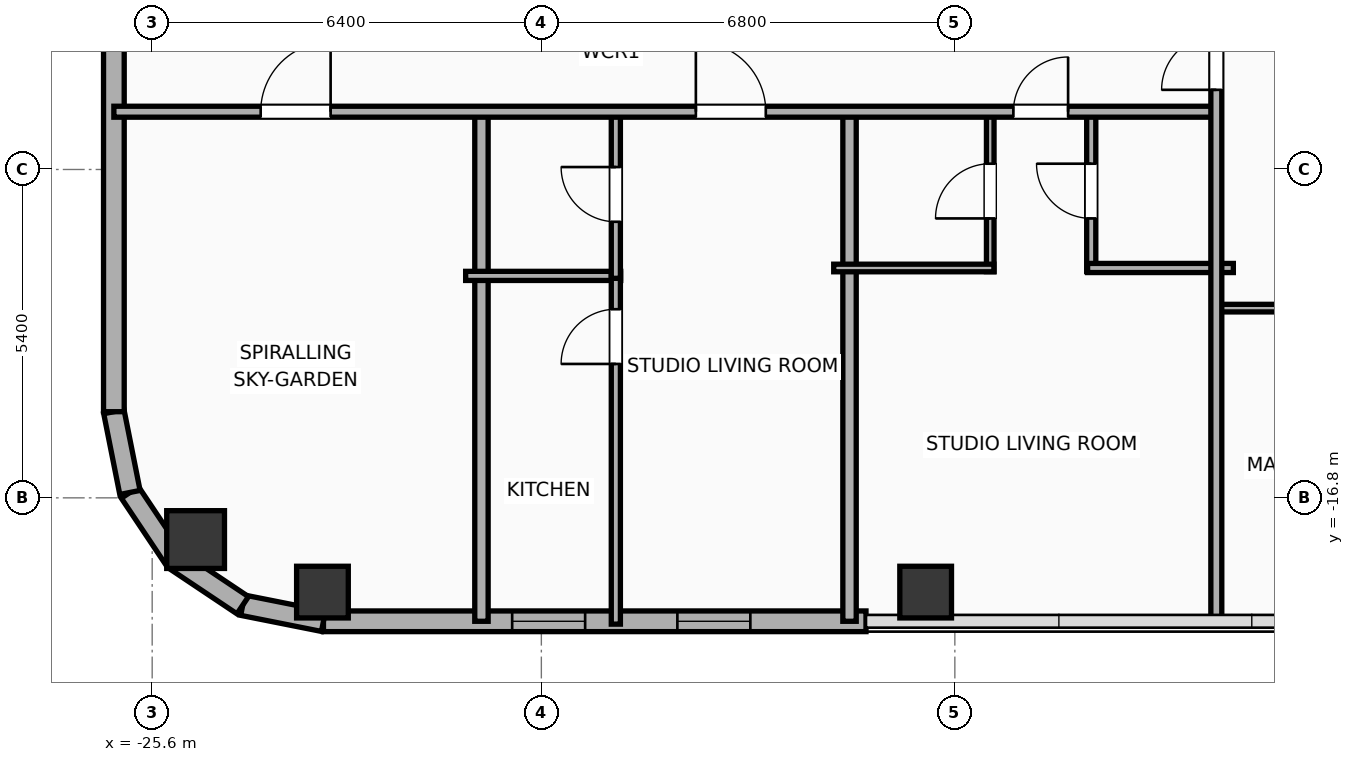
"""IFC4 building model, lengths in metres.
Left out: names, types, materials, properties, quantities, classifications, styles, units other than length and angle.
Written with IfcOpenShell. Run it as: python <this file> out.ifc"""

import sys

from ifc_helpers import new_model, si_unit, direction, frame, frame_2d, origin, origin_2d, place, context, subcontext, project, spatial, rectangle, hollow_rectangle, hollow_circle, extrude, element, fill, save


model = new_model("IFC4")
c1 = context("Model", 3, precision=1e-05, world=origin(), true_north=direction((0.0, 1.0)))
c2 = subcontext(c1, "Body", "Model", "MODEL_VIEW")
j1 = project(units=[si_unit("LENGTHUNIT", "METRE"), si_unit("PLANEANGLEUNIT", "RADIAN")], contexts=[c1])
p1 = place(None, origin())
s1 = spatial("IfcSite", under=j1, at=p1, CompositionType="ELEMENT")
p2 = place(p1, origin())
s2 = spatial("IfcBuilding", under=s1, at=p2, CompositionType="ELEMENT")
p3 = place(p2, frame((0.0, 0.0, 204.1)))
s3 = spatial("IfcBuildingStorey", under=s2, at=p3, CompositionType="ELEMENT", Elevation=204.1)
for number, where, z_axis, x_axis in (
    (1, (-22.8, -18.35, 0.0), (0.0, 0.0, 1.0), (1.0, 0.0, 0.0)),
    (2, (-12.88, -18.35, 0.0), (0.0, 0.0, 1.0), (1.0, 0.0, 0.0)),
):
    element("IfcColumn", number, at=place(p3, frame(where, z_axis=z_axis, x_axis=x_axis)), inside=s3, PredefinedType="COLUMN", context=c2, shape_type="SweptSolid", body=[
        extrude(hollow_rectangle(XDim=0.85, YDim=0.85, WallThickness=0.028, at=origin_2d()), origin(), (0.0, 0.0, 1.0), 3.9),
    ])
p4 = place(p3, frame((-24.886, -17.486, 0.0), z_axis=(0.0, 0.0, 1.0), x_axis=(1.0, 0.0, 0.0)))
e3 = element("IfcColumn", 3, at=p4, inside=s3, PredefinedType="COLUMN", context=c2, shape_type="SweptSolid", body=[
    extrude(hollow_circle(Radius=0.475, WallThickness=0.032, at=origin_2d()), origin(), (0.0, 0.0, 1.0), 3.9),
])
p5 = place(p3, frame((-13.861, -18.83, 0.0), z_axis=(0.0, 0.0, 1.0), x_axis=(-1.0, 0.0, 0.0)))
e4 = element("IfcWall", 4, at=p5, inside=s3, PredefinedType="ELEMENTEDWALL", context=c2, shape_type="SweptSolid", body=[
    extrude(rectangle(XDim=8.922, YDim=0.34, at=frame_2d((4.461, 0.0))), origin(), (0.0, 0.0, 1.0), 3.65),
])
p6 = place(p5, frame((1.902, 0.0, 0.75)))
e5 = element("IfcOpeningElement", 5, at=p6, cuts=e4, PredefinedType="OPENING", context=c2, shape_type="SweptSolid", body=[
    extrude(rectangle(XDim=1.2, YDim=2.05, at=frame_2d((0.6, 1.025))), frame((0.0, 0.18, 0.0), z_axis=(0.0, -1.0, 0.0), x_axis=(1.0, 0.0, 0.0)), (0.0, 0.0, 1.0), 0.36),
])
p7 = place(p5, frame((4.619, 0.0, 0.75)))
e6 = element("IfcOpeningElement", 6, at=p7, cuts=e4, PredefinedType="OPENING", context=c2, shape_type="SweptSolid", body=[
    extrude(rectangle(XDim=1.2, YDim=2.05, at=frame_2d((0.6, 1.025))), frame((0.0, 0.18, 0.0), z_axis=(0.0, -1.0, 0.0), x_axis=(1.0, 0.0, 0.0)), (0.0, 0.0, 1.0), 0.36),
])
p8 = place(p3, frame((-22.783, -18.83, 0.0), z_axis=(0.0, 0.0, 1.0), x_axis=(-0.980788153188, 0.195075878998, 0.0)))
e7 = element("IfcWall", 7, at=p8, inside=s3, PredefinedType="ELEMENTEDWALL", context=c2, shape_type="SweptSolid", body=[
    extrude(rectangle(XDim=1.354, YDim=0.34, at=frame_2d((0.677, 0.0))), origin(), (0.0, 0.0, 1.0), 3.65),
])
p9 = place(p3, frame((-24.111, -18.566, 0.0), z_axis=(0.0, 0.0, 1.0), x_axis=(-0.831403586725, 0.555669034571, 0.0)))
e8 = element("IfcWall", 8, at=p9, inside=s3, PredefinedType="ELEMENTEDWALL", context=c2, shape_type="SweptSolid", body=[
    extrude(rectangle(XDim=1.337, YDim=0.34, at=frame_2d((0.668, 0.0))), origin(), (0.0, 0.0, 1.0), 3.65),
])
p10 = place(p3, frame((-25.223, -17.823, 0.0), z_axis=(0.0, 0.0, 1.0), x_axis=(-0.555584683399, 0.831459956686, 0.0)))
e9 = element("IfcWall", 9, at=p10, inside=s3, PredefinedType="ELEMENTEDWALL", context=c2, shape_type="SweptSolid", body=[
    extrude(rectangle(XDim=1.337, YDim=0.34, at=frame_2d((0.668, 0.0))), origin(), (0.0, 0.0, 1.0), 3.65),
])
p11 = place(p3, frame((-25.966, -16.711, 0.0), z_axis=(0.0, 0.0, 1.0), x_axis=(-0.195110379894, 0.98078129043, 0.0)))
e10 = element("IfcWall", 10, at=p11, inside=s3, PredefinedType="ELEMENTEDWALL", context=c2, shape_type="SweptSolid", body=[
    extrude(rectangle(XDim=1.354, YDim=0.34, at=frame_2d((0.677, 0.0))), origin(), (0.0, 0.0, 1.0), 3.65),
])
p12 = place(p3, frame((-26.23, -15.383, 0.0), z_axis=(0.0, 0.0, 1.0), x_axis=(0.0, 1.0, 0.0)))
e11 = element("IfcWall", 11, at=p12, inside=s3, PredefinedType="ELEMENTEDWALL", context=c2, shape_type="SweptSolid", body=[
    extrude(rectangle(XDim=31.967, YDim=0.34, at=frame_2d((15.983, 0.0))), origin(), (0.0, 0.0, 1.0), 3.65),
])
p13 = place(p12, frame((29.431, 0.0, 0.75)))
e12 = element("IfcOpeningElement", 12, at=p13, cuts=e11, PredefinedType="OPENING", context=c2, shape_type="SweptSolid", body=[
    extrude(rectangle(XDim=1.2, YDim=2.05, at=frame_2d((0.6, 1.025))), frame((0.0, 0.18, 0.0), z_axis=(0.0, -1.0, 0.0), x_axis=(1.0, 0.0, 0.0)), (0.0, 0.0, 1.0), 0.36),
])
p14 = place(p12, frame((20.603, 0.0, 0.75)))
e13 = element("IfcOpeningElement", 13, at=p14, cuts=e11, PredefinedType="OPENING", context=c2, shape_type="SweptSolid", body=[
    extrude(rectangle(XDim=1.2, YDim=2.05, at=frame_2d((0.6, 1.025))), frame((0.0, 0.18, 0.0), z_axis=(0.0, -1.0, 0.0), x_axis=(1.0, 0.0, 0.0)), (0.0, 0.0, 1.0), 0.36),
])
p15 = place(p12, frame((9.778, 0.0, 0.75)))
e14 = element("IfcOpeningElement", 14, at=p15, cuts=e11, PredefinedType="OPENING", context=c2, shape_type="SweptSolid", body=[
    extrude(rectangle(XDim=1.2, YDim=2.05, at=frame_2d((0.6, 1.025))), frame((0.0, 0.18, 0.0), z_axis=(0.0, -1.0, 0.0), x_axis=(1.0, 0.0, 0.0)), (0.0, 0.0, 1.0), 0.36),
])
p16 = place(p3, frame((-20.185, -18.83, 0.0), z_axis=(0.0, 0.0, 1.0), x_axis=(0.0, 1.0, 0.0)))
e15 = element("IfcWall", 15, at=p16, inside=s3, PredefinedType="PARTITIONING", context=c2, shape_type="SweptSolid", body=[
    extrude(rectangle(XDim=8.46, YDim=0.22, at=frame_2d((4.23, 0.0))), origin(), (0.0, 0.0, 1.0), 3.09),
])
p17 = place(p3, frame((-20.445, -13.15, 0.0), z_axis=(0.0, 0.0, 1.0), x_axis=(1.0, 0.0, 0.0)))
e16 = element("IfcWall", 16, at=p17, inside=s3, PredefinedType="PLUMBINGWALL", context=c2, shape_type="SweptSolid", body=[
    extrude(rectangle(XDim=2.55, YDim=0.15, at=frame_2d((1.275, 0.0))), origin(), (0.0, 0.0, 1.0), 3.65),
])
p18 = place(p3, frame((-17.975, -18.877, 0.0), z_axis=(0.0, 0.0, 1.0), x_axis=(0.0, 1.0, 0.0)))
e17 = element("IfcWall", 17, at=p18, inside=s3, PredefinedType="PLUMBINGWALL", context=c2, shape_type="SweptSolid", body=[
    extrude(rectangle(XDim=5.767, YDim=0.15, at=frame_2d((2.883, 0.0))), origin(), (0.0, 0.0, 1.0), 3.65),
])
p19 = place(p18, frame((4.279, 0.0, 0.0)))
e18 = element("IfcOpeningElement", 18, at=p19, cuts=e17, PredefinedType="OPENING", context=c2, shape_type="SweptSolid", body=[
    extrude(rectangle(XDim=0.9, YDim=2.05, at=frame_2d((0.45, 1.025))), frame((0.0, 0.085, 0.0), z_axis=(0.0, -1.0, 0.0), x_axis=(1.0, 0.0, 0.0)), (0.0, 0.0, 1.0), 0.17),
])
p20 = place(p3, frame((-17.975, -13.19, 0.0), z_axis=(0.0, 0.0, 1.0), x_axis=(0.0, 1.0, 0.0)))
e19 = element("IfcWall", 19, at=p20, inside=s3, PredefinedType="PLUMBINGWALL", context=c2, shape_type="SweptSolid", body=[
    extrude(rectangle(XDim=2.76, YDim=0.15, at=frame_2d((1.38, 0.0))), origin(), (0.0, 0.0, 1.0), 3.65),
])
p21 = place(p20, frame((0.93, 0.0, 0.0)))
e20 = element("IfcOpeningElement", 20, at=p21, cuts=e19, PredefinedType="OPENING", context=c2, shape_type="SweptSolid", body=[
    extrude(rectangle(XDim=0.9, YDim=2.05, at=frame_2d((0.45, 1.025))), frame((0.0, 0.085, 0.0), z_axis=(0.0, -1.0, 0.0), x_axis=(1.0, 0.0, 0.0)), (0.0, 0.0, 1.0), 0.17),
])
p22 = place(p3, frame((-14.132, -18.83, 0.0), z_axis=(0.0, 0.0, 1.0), x_axis=(0.0, 1.0, 0.0)))
e21 = element("IfcWall", 21, at=p22, inside=s3, PredefinedType="PARTITIONING", context=c2, shape_type="SweptSolid", body=[
    extrude(rectangle(XDim=8.46, YDim=0.22, at=frame_2d((4.23, 0.0))), origin(), (0.0, 0.0, 1.0), 3.65),
])
p23 = place(p3, frame((-11.818, -13.08, 0.0), z_axis=(0.0, 0.0, 1.0), x_axis=(0.0, 1.0, 0.0)))
e22 = element("IfcWall", 22, at=p23, inside=s3, PredefinedType="PARTITIONING", context=c2, shape_type="SweptSolid", body=[
    extrude(rectangle(XDim=2.65, YDim=0.125, at=frame_2d((1.325, 0.0))), origin(), (0.0, 0.0, 1.0), 3.65),
])
p24 = place(p23, frame((0.875, 0.0, 0.0)))
e23 = element("IfcOpeningElement", 23, at=p24, cuts=e22, PredefinedType="OPENING", context=c2, shape_type="SweptSolid", body=[
    extrude(rectangle(XDim=0.9, YDim=2.05, at=frame_2d((0.45, 1.025))), frame((0.0, 0.073, 0.0), z_axis=(0.0, -1.0, 0.0), x_axis=(1.0, 0.0, 0.0)), (0.0, 0.0, 1.0), 0.145),
])
p25 = place(p3, frame((-10.157, -13.08, 0.0), z_axis=(0.0, 0.0, 1.0), x_axis=(0.0, 1.0, 0.0)))
e24 = element("IfcWall", 24, at=p25, inside=s3, PredefinedType="PLUMBINGWALL", context=c2, shape_type="SweptSolid", body=[
    extrude(rectangle(XDim=2.65, YDim=0.15, at=frame_2d((1.325, 0.0))), origin(), (0.0, 0.0, 1.0), 3.65),
])
p26 = place(p25, frame((0.875, 0.0, 0.0)))
e25 = element("IfcOpeningElement", 25, at=p26, cuts=e24, PredefinedType="OPENING", context=c2, shape_type="SweptSolid", body=[
    extrude(rectangle(XDim=0.9, YDim=2.05, at=frame_2d((0.45, 1.025))), frame((0.0, 0.085, 0.0), z_axis=(0.0, -1.0, 0.0), x_axis=(1.0, 0.0, 0.0)), (0.0, 0.0, 1.0), 0.17),
])
p27 = place(p3, frame((-14.392, -13.02, 0.0), z_axis=(0.0, 0.0, 1.0), x_axis=(1.0, 0.0, 0.0)))
e26 = element("IfcWall", 26, at=p27, inside=s3, PredefinedType="PARTITIONING", context=c2, shape_type="SweptSolid", body=[
    extrude(rectangle(XDim=2.634, YDim=0.125, at=frame_2d((1.317, 0.0))), origin(), (0.0, 0.0, 1.0), 3.65),
])
p28 = place(p3, frame((-10.217, -13.02, 0.0), z_axis=(0.0, 0.0, 1.0), x_axis=(1.0, 0.0, 0.0)))
e27 = element("IfcWall", 27, at=p28, inside=s3, PredefinedType="PLUMBINGWALL", context=c2, shape_type="SweptSolid", body=[
    extrude(rectangle(XDim=2.397, YDim=0.15, at=frame_2d((1.198, 0.0))), origin(), (0.0, 0.0, 1.0), 3.65),
])
p29 = place(p3, frame((-26.23, -10.45, 0.0), z_axis=(0.0, 0.0, 1.0), x_axis=(1.0, 0.0, 0.0)))
e28 = element("IfcWall", 28, at=p29, inside=s3, PredefinedType="PARTITIONING", context=c2, shape_type="SweptSolid", body=[
    extrude(rectangle(XDim=18.15, YDim=0.18, at=frame_2d((9.075, 0.0))), origin(), (0.0, 0.0, 1.0), 3.65),
])
p30 = place(p29, frame((2.414, 0.0, 0.0)))
e29 = element("IfcOpeningElement", 29, at=p30, cuts=e28, PredefinedType="OPENING", context=c2, shape_type="SweptSolid", body=[
    extrude(rectangle(XDim=1.15, YDim=2.05, at=frame_2d((0.575, 1.025))), frame((0.0, 0.1, 0.0), z_axis=(0.0, -1.0, 0.0), x_axis=(1.0, 0.0, 0.0)), (0.0, 0.0, 1.0), 0.2),
])
p31 = place(p29, frame((9.571, 0.0, 0.0)))
e30 = element("IfcOpeningElement", 30, at=p31, cuts=e28, PredefinedType="OPENING", context=c2, shape_type="SweptSolid", body=[
    extrude(rectangle(XDim=1.15, YDim=2.05, at=frame_2d((0.575, 1.025))), frame((0.0, 0.1, 0.0), z_axis=(0.0, -1.0, 0.0), x_axis=(1.0, 0.0, 0.0)), (0.0, 0.0, 1.0), 0.2),
])
p32 = place(p29, frame((14.792, 0.0, 0.0)))
e31 = element("IfcOpeningElement", 31, at=p32, cuts=e28, PredefinedType="OPENING", context=c2, shape_type="SweptSolid", body=[
    extrude(rectangle(XDim=0.9, YDim=2.05, at=frame_2d((0.45, 1.025))), frame((0.0, 0.1, 0.0), z_axis=(0.0, -1.0, 0.0), x_axis=(1.0, 0.0, 0.0)), (0.0, 0.0, 1.0), 0.2),
])
p33 = place(p3, frame((-8.08, -13.68, 0.0), z_axis=(0.0, 0.0, 1.0), x_axis=(1.0, 0.0, 0.0)))
e32 = element("IfcWall", 32, at=p33, inside=s3, PredefinedType="PARTITIONING", context=c2, shape_type="SweptSolid", body=[
    extrude(rectangle(XDim=8.06, YDim=0.125, at=frame_2d((4.03, 0.0))), origin(), (0.0, 0.0, 1.0), 3.65),
])
p34 = place(p33, frame((1.323, 0.0, 0.0)))
e33 = element("IfcOpeningElement", 33, at=p34, cuts=e32, PredefinedType="OPENING", context=c2, shape_type="SweptSolid", body=[
    extrude(rectangle(XDim=0.9, YDim=2.05, at=frame_2d((0.45, 1.025))), frame((0.0, 0.073, 0.0), z_axis=(0.0, -1.0, 0.0), x_axis=(1.0, 0.0, 0.0)), (0.0, 0.0, 1.0), 0.145),
])
p35 = place(p33, frame((4.547, 0.0, 0.0)))
e34 = element("IfcOpeningElement", 34, at=p35, cuts=e32, PredefinedType="OPENING", context=c2, shape_type="SweptSolid", body=[
    extrude(rectangle(XDim=0.9, YDim=2.05, at=frame_2d((0.45, 1.025))), frame((0.0, 0.073, 0.0), z_axis=(0.0, -1.0, 0.0), x_axis=(1.0, 0.0, 0.0)), (0.0, 0.0, 1.0), 0.145),
])
p36 = place(p3, frame((-8.1, -18.83, 0.0), z_axis=(0.0, 0.0, 1.0), x_axis=(0.0, 1.0, 0.0)))
e35 = element("IfcWall", 35, at=p36, inside=s3, PredefinedType="PARTITIONING", context=c2, shape_type="SweptSolid", body=[
    extrude(rectangle(XDim=9.99, YDim=0.18, at=frame_2d((4.995, 0.0))), origin(), (0.0, 0.0, 1.0), 3.65),
])
p37 = place(p36, frame((8.74, 0.0, 0.0)))
e36 = element("IfcOpeningElement", 36, at=p37, cuts=e35, PredefinedType="OPENING", context=c2, shape_type="SweptSolid", body=[
    extrude(rectangle(XDim=0.9, YDim=2.05, at=frame_2d((0.45, 1.025))), frame((0.0, 0.1, 0.0), z_axis=(0.0, -1.0, 0.0), x_axis=(1.0, 0.0, 0.0)), (0.0, 0.0, 1.0), 0.2),
])
p38 = place(p6, origin())
e37 = element("IfcWindow", 37, at=p38, inside=s3, PartitioningType="SINGLE_PANEL", PredefinedType="WINDOW", context=c2, shape_type="SweptSolid", body=[
    extrude(rectangle(XDim=1.2, YDim=2.05, at=frame_2d((0.6, 1.025))), frame((0.0, 0.03, 0.0), z_axis=(0.0, -1.0, 0.0), x_axis=(1.0, 0.0, 0.0)), (0.0, 0.0, 1.0), 0.06),
])
fill(e5, e37)
p39 = place(p7, origin())
e38 = element("IfcWindow", 38, at=p39, inside=s3, PartitioningType="SINGLE_PANEL", PredefinedType="WINDOW", context=c2, shape_type="SweptSolid", body=[
    extrude(rectangle(XDim=1.2, YDim=2.05, at=frame_2d((0.6, 1.025))), frame((0.0, 0.03, 0.0), z_axis=(0.0, -1.0, 0.0), x_axis=(1.0, 0.0, 0.0)), (0.0, 0.0, 1.0), 0.06),
])
fill(e6, e38)
p40 = place(p19, origin())
e39 = element("IfcDoor", 39, at=p40, inside=s3, OperationType="SINGLE_SWING_LEFT", PredefinedType="DOOR", context=c2, shape_type="SweptSolid", body=[
    extrude(rectangle(XDim=0.9, YDim=2.05, at=frame_2d((0.45, 1.025))), frame((0.0, 0.025, 0.0), z_axis=(0.0, -1.0, 0.0), x_axis=(1.0, 0.0, 0.0)), (0.0, 0.0, 1.0), 0.05),
])
fill(e18, e39)
p41 = place(p21, origin())
e40 = element("IfcDoor", 40, at=p41, inside=s3, OperationType="SINGLE_SWING_RIGHT", PredefinedType="DOOR", context=c2, shape_type="SweptSolid", body=[
    extrude(rectangle(XDim=0.9, YDim=2.05, at=frame_2d((0.45, 1.025))), frame((0.0, 0.025, 0.0), z_axis=(0.0, -1.0, 0.0), x_axis=(1.0, 0.0, 0.0)), (0.0, 0.0, 1.0), 0.05),
])
fill(e20, e40)
p42 = place(p24, origin())
e41 = element("IfcDoor", 41, at=p42, inside=s3, OperationType="SINGLE_SWING_LEFT", PredefinedType="DOOR", context=c2, shape_type="SweptSolid", body=[
    extrude(rectangle(XDim=0.9, YDim=2.05, at=frame_2d((0.45, 1.025))), frame((0.0, 0.025, 0.0), z_axis=(0.0, -1.0, 0.0), x_axis=(1.0, 0.0, 0.0)), (0.0, 0.0, 1.0), 0.05),
])
fill(e23, e41)
p43 = place(p26, origin())
e42 = element("IfcDoor", 42, at=p43, inside=s3, OperationType="SINGLE_SWING_RIGHT", PredefinedType="DOOR", context=c2, shape_type="SweptSolid", body=[
    extrude(rectangle(XDim=0.9, YDim=2.05, at=frame_2d((0.45, 1.025))), frame((0.0, 0.025, 0.0), z_axis=(0.0, -1.0, 0.0), x_axis=(1.0, 0.0, 0.0)), (0.0, 0.0, 1.0), 0.05),
])
fill(e25, e42)
p44 = place(p30, origin())
e43 = element("IfcDoor", 43, at=p44, inside=s3, OperationType="SINGLE_SWING_RIGHT", PredefinedType="DOOR", context=c2, shape_type="SweptSolid", body=[
    extrude(rectangle(XDim=1.15, YDim=2.05, at=frame_2d((0.575, 1.025))), frame((0.0, 0.025, 0.0), z_axis=(0.0, -1.0, 0.0), x_axis=(1.0, 0.0, 0.0)), (0.0, 0.0, 1.0), 0.05),
])
fill(e29, e43)
p45 = place(p31, origin())
e44 = element("IfcDoor", 44, at=p45, inside=s3, OperationType="SINGLE_SWING_LEFT", PredefinedType="DOOR", context=c2, shape_type="SweptSolid", body=[
    extrude(rectangle(XDim=1.15, YDim=2.05, at=frame_2d((0.575, 1.025))), frame((0.0, 0.025, 0.0), z_axis=(0.0, -1.0, 0.0), x_axis=(1.0, 0.0, 0.0)), (0.0, 0.0, 1.0), 0.05),
])
fill(e30, e44)
p46 = place(p32, origin())
e45 = element("IfcDoor", 45, at=p46, inside=s3, OperationType="SINGLE_SWING_RIGHT", PredefinedType="DOOR", context=c2, shape_type="SweptSolid", body=[
    extrude(rectangle(XDim=0.9, YDim=2.05, at=frame_2d((0.45, 1.025))), frame((0.0, 0.025, 0.0), z_axis=(0.0, -1.0, 0.0), x_axis=(1.0, 0.0, 0.0)), (0.0, 0.0, 1.0), 0.05),
])
fill(e31, e45)
p47 = place(p37, origin())
e46 = element("IfcDoor", 46, at=p47, inside=s3, OperationType="SINGLE_SWING_LEFT", PredefinedType="DOOR", context=c2, shape_type="SweptSolid", body=[
    extrude(rectangle(XDim=0.9, YDim=2.05, at=frame_2d((0.45, 1.025))), frame((0.0, 0.025, 0.0), z_axis=(0.0, -1.0, 0.0), x_axis=(1.0, 0.0, 0.0)), (0.0, 0.0, 1.0), 0.05),
])
fill(e36, e46)
save(model, sys.argv[1])
